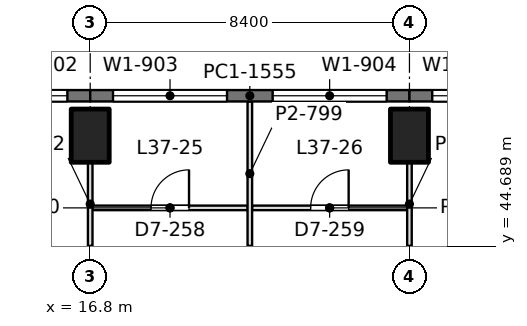
"""IFC4 building model, lengths in metres.
Left out: names, types, materials, properties, quantities, classifications, styles, units other than length and angle.
Written with IfcOpenShell. Run it as: python <this file> out.ifc"""

import sys

from ifc_helpers import new_model, si_unit, direction, frame, frame_2d, origin, origin_2d, place, context, subcontext, project, spatial, rectangle, extrude, element, fill, save


model = new_model("IFC4")
c1 = context("Model", 3, precision=1e-05, world=origin(), true_north=direction((0.0, 1.0)))
c2 = subcontext(c1, "Body", "Model", "MODEL_VIEW")
j1 = project(units=[si_unit("LENGTHUNIT", "METRE"), si_unit("PLANEANGLEUNIT", "RADIAN")], contexts=[c1])
p1 = place(None, origin())
s1 = spatial("IfcSite", under=j1, at=p1, CompositionType="ELEMENT")
p2 = place(p1, origin())
s2 = spatial("IfcBuilding", under=s1, at=p2, CompositionType="ELEMENT")
p3 = place(p2, frame((0.0, 0.0, 163.8)))
s3 = spatial("IfcBuildingStorey", under=s2, at=p3, CompositionType="ELEMENT", Elevation=163.8)
for number, where, z_axis, x_axis in (
    (1, (16.8, 47.6, 0.0), (0.0, 0.0, 1.0), (1.0, 0.0, 0.0)),
    (2, (25.2, 47.6, 0.0), (0.0, 0.0, 1.0), (1.0, 0.0, 0.0)),
):
    element("IfcColumn", number, at=place(p3, frame(where, z_axis=z_axis, x_axis=x_axis)), inside=s3, PredefinedType="COLUMN", context=c2, shape_type="SweptSolid", body=[
        extrude(rectangle(XDim=1.0, YDim=1.4, at=origin_2d()), origin(), (0.0, 0.0, 1.0), 4.2),
    ])
p4 = place(p3, frame((8.4, 48.65, 0.0), z_axis=(0.0, 0.0, 1.0), x_axis=(1.0, 0.0, 0.0)))
e3 = element("IfcWall", 3, at=p4, inside=s3, PredefinedType="SOLIDWALL", context=c2, shape_type="SweptSolid", body=[
    extrude(rectangle(XDim=8.4, YDim=0.3, at=frame_2d((4.2, 0.0))), origin(), (0.0, 0.0, 1.0), 4.0),
])
p5 = place(p4, frame((0.6, 0.0, 0.9)))
e4 = element("IfcOpeningElement", 4, at=p5, cuts=e3, PredefinedType="OPENING", context=c2, shape_type="SweptSolid", body=[
    extrude(rectangle(XDim=3.0, YDim=1.9, at=frame_2d((1.5, 0.95))), frame((0.0, 0.16, 0.0), z_axis=(0.0, -1.0, 0.0), x_axis=(1.0, 0.0, 0.0)), (0.0, 0.0, 1.0), 0.32),
])
p6 = place(p4, frame((4.8, 0.0, 0.9)))
e5 = element("IfcOpeningElement", 5, at=p6, cuts=e3, PredefinedType="OPENING", context=c2, shape_type="SweptSolid", body=[
    extrude(rectangle(XDim=3.0, YDim=1.9, at=frame_2d((1.5, 0.95))), frame((0.0, 0.16, 0.0), z_axis=(0.0, -1.0, 0.0), x_axis=(1.0, 0.0, 0.0)), (0.0, 0.0, 1.0), 0.32),
])
p7 = place(p3, frame((16.8, 48.65, 0.0), z_axis=(0.0, 0.0, 1.0), x_axis=(1.0, 0.0, 0.0)))
e6 = element("IfcWall", 6, at=p7, inside=s3, PredefinedType="SOLIDWALL", context=c2, shape_type="SweptSolid", body=[
    extrude(rectangle(XDim=8.4, YDim=0.3, at=frame_2d((4.2, 0.0))), origin(), (0.0, 0.0, 1.0), 4.0),
])
p8 = place(p7, frame((0.6, 0.0, 0.9)))
e7 = element("IfcOpeningElement", 7, at=p8, cuts=e6, PredefinedType="OPENING", context=c2, shape_type="SweptSolid", body=[
    extrude(rectangle(XDim=3.0, YDim=1.9, at=frame_2d((1.5, 0.95))), frame((0.0, 0.16, 0.0), z_axis=(0.0, -1.0, 0.0), x_axis=(1.0, 0.0, 0.0)), (0.0, 0.0, 1.0), 0.32),
])
p9 = place(p7, frame((4.8, 0.0, 0.9)))
e8 = element("IfcOpeningElement", 8, at=p9, cuts=e6, PredefinedType="OPENING", context=c2, shape_type="SweptSolid", body=[
    extrude(rectangle(XDim=3.0, YDim=1.9, at=frame_2d((1.5, 0.95))), frame((0.0, 0.16, 0.0), z_axis=(0.0, -1.0, 0.0), x_axis=(1.0, 0.0, 0.0)), (0.0, 0.0, 1.0), 0.32),
])
p10 = place(p3, frame((25.2, 48.65, 0.0), z_axis=(0.0, 0.0, 1.0), x_axis=(1.0, 0.0, 0.0)))
e9 = element("IfcWall", 9, at=p10, inside=s3, PredefinedType="SOLIDWALL", context=c2, shape_type="SweptSolid", body=[
    extrude(rectangle(XDim=8.4, YDim=0.3, at=frame_2d((4.2, 0.0))), origin(), (0.0, 0.0, 1.0), 4.0),
])
p11 = place(p10, frame((0.6, 0.0, 0.9)))
e10 = element("IfcOpeningElement", 10, at=p11, cuts=e9, PredefinedType="OPENING", context=c2, shape_type="SweptSolid", body=[
    extrude(rectangle(XDim=3.0, YDim=1.9, at=frame_2d((1.5, 0.95))), frame((0.0, 0.16, 0.0), z_axis=(0.0, -1.0, 0.0), x_axis=(1.0, 0.0, 0.0)), (0.0, 0.0, 1.0), 0.32),
])
p12 = place(p10, frame((4.8, 0.0, 0.9)))
e11 = element("IfcOpeningElement", 11, at=p12, cuts=e9, PredefinedType="OPENING", context=c2, shape_type="SweptSolid", body=[
    extrude(rectangle(XDim=3.0, YDim=1.9, at=frame_2d((1.5, 0.95))), frame((0.0, 0.16, 0.0), z_axis=(0.0, -1.0, 0.0), x_axis=(1.0, 0.0, 0.0)), (0.0, 0.0, 1.0), 0.32),
])
p13 = place(p3, frame((16.858, 45.7, 0.0), z_axis=(0.0, 0.0, 1.0), x_axis=(1.0, 0.0, 0.0)))
e12 = element("IfcWall", 12, at=p13, inside=s3, PredefinedType="PARTITIONING", context=c2, shape_type="SweptSolid", body=[
    extrude(rectangle(XDim=4.084, YDim=0.12, at=frame_2d((2.042, 0.0))), origin(), (0.0, 0.0, 1.0), 3.3),
])
p14 = place(p13, frame((1.542, 0.0, 0.0)))
e13 = element("IfcOpeningElement", 13, at=p14, cuts=e12, PredefinedType="OPENING", context=c2, shape_type="SweptSolid", body=[
    extrude(rectangle(XDim=1.0, YDim=2.4, at=frame_2d((0.5, 1.2))), frame((0.0, 0.07, 0.0), z_axis=(0.0, -1.0, 0.0), x_axis=(1.0, 0.0, 0.0)), (0.0, 0.0, 1.0), 0.14),
])
p15 = place(p3, frame((21.058, 45.7, 0.0), z_axis=(0.0, 0.0, 1.0), x_axis=(1.0, 0.0, 0.0)))
e14 = element("IfcWall", 14, at=p15, inside=s3, PredefinedType="PARTITIONING", context=c2, shape_type="SweptSolid", body=[
    extrude(rectangle(XDim=4.084, YDim=0.12, at=frame_2d((2.042, 0.0))), origin(), (0.0, 0.0, 1.0), 3.3),
])
p16 = place(p15, frame((1.542, 0.0, 0.0)))
e15 = element("IfcOpeningElement", 15, at=p16, cuts=e14, PredefinedType="OPENING", context=c2, shape_type="SweptSolid", body=[
    extrude(rectangle(XDim=1.0, YDim=2.4, at=frame_2d((0.5, 1.2))), frame((0.0, 0.07, 0.0), z_axis=(0.0, -1.0, 0.0), x_axis=(1.0, 0.0, 0.0)), (0.0, 0.0, 1.0), 0.14),
])
p17 = place(p3, frame((16.8, 44.7, 0.0), z_axis=(0.0, 0.0, 1.0), x_axis=(0.0, 1.0, 0.0)))
e16 = element("IfcWall", 16, at=p17, inside=s3, PredefinedType="PARTITIONING", context=c2, shape_type="SweptSolid", body=[
    extrude(rectangle(XDim=2.201, YDim=0.12, at=frame_2d((1.101, 0.0))), origin(), (0.0, 0.0, 1.0), 3.3),
])
p18 = place(p3, frame((21.0, 44.7, 0.0), z_axis=(0.0, 0.0, 1.0), x_axis=(0.0, 1.0, 0.0)))
e17 = element("IfcWall", 17, at=p18, inside=s3, PredefinedType="PARTITIONING", context=c2, shape_type="SweptSolid", body=[
    extrude(rectangle(XDim=3.802, YDim=0.12, at=frame_2d((1.901, 0.0))), origin(), (0.0, 0.0, 1.0), 3.593),
])
p19 = place(p3, frame((25.2, 44.7, 0.0), z_axis=(0.0, 0.0, 1.0), x_axis=(0.0, 1.0, 0.0)))
e18 = element("IfcWall", 18, at=p19, inside=s3, PredefinedType="PARTITIONING", context=c2, shape_type="SweptSolid", body=[
    extrude(rectangle(XDim=2.201, YDim=0.12, at=frame_2d((1.101, 0.0))), origin(), (0.0, 0.0, 1.0), 3.3),
])
p20 = place(p6, origin())
e19 = element("IfcWindow", 19, at=p20, inside=s3, PartitioningType="SINGLE_PANEL", PredefinedType="WINDOW", context=c2, shape_type="SweptSolid", body=[
    extrude(rectangle(XDim=3.0, YDim=1.9, at=frame_2d((1.5, 0.95))), frame((0.0, 0.03, 0.0), z_axis=(0.0, -1.0, 0.0), x_axis=(1.0, 0.0, 0.0)), (0.0, 0.0, 1.0), 0.06),
])
fill(e5, e19)
p21 = place(p8, origin())
e20 = element("IfcWindow", 20, at=p21, inside=s3, PartitioningType="SINGLE_PANEL", PredefinedType="WINDOW", context=c2, shape_type="SweptSolid", body=[
    extrude(rectangle(XDim=3.0, YDim=1.9, at=frame_2d((1.5, 0.95))), frame((0.0, 0.03, 0.0), z_axis=(0.0, -1.0, 0.0), x_axis=(1.0, 0.0, 0.0)), (0.0, 0.0, 1.0), 0.06),
])
fill(e7, e20)
p22 = place(p9, origin())
e21 = element("IfcWindow", 21, at=p22, inside=s3, PartitioningType="SINGLE_PANEL", PredefinedType="WINDOW", context=c2, shape_type="SweptSolid", body=[
    extrude(rectangle(XDim=3.0, YDim=1.9, at=frame_2d((1.5, 0.95))), frame((0.0, 0.03, 0.0), z_axis=(0.0, -1.0, 0.0), x_axis=(1.0, 0.0, 0.0)), (0.0, 0.0, 1.0), 0.06),
])
fill(e8, e21)
p23 = place(p11, origin())
e22 = element("IfcWindow", 22, at=p23, inside=s3, PartitioningType="SINGLE_PANEL", PredefinedType="WINDOW", context=c2, shape_type="SweptSolid", body=[
    extrude(rectangle(XDim=3.0, YDim=1.9, at=frame_2d((1.5, 0.95))), frame((0.0, 0.03, 0.0), z_axis=(0.0, -1.0, 0.0), x_axis=(1.0, 0.0, 0.0)), (0.0, 0.0, 1.0), 0.06),
])
fill(e10, e22)
p24 = place(p14, origin())
e23 = element("IfcDoor", 23, at=p24, inside=s3, OperationType="SINGLE_SWING_RIGHT", PredefinedType="DOOR", context=c2, shape_type="SweptSolid", body=[
    extrude(rectangle(XDim=1.0, YDim=2.4, at=frame_2d((0.5, 1.2))), frame((0.0, 0.025, 0.0), z_axis=(0.0, -1.0, 0.0), x_axis=(1.0, 0.0, 0.0)), (0.0, 0.0, 1.0), 0.05),
])
fill(e13, e23)
p25 = place(p16, origin())
e24 = element("IfcDoor", 24, at=p25, inside=s3, OperationType="SINGLE_SWING_RIGHT", PredefinedType="DOOR", context=c2, shape_type="SweptSolid", body=[
    extrude(rectangle(XDim=1.0, YDim=2.4, at=frame_2d((0.5, 1.2))), frame((0.0, 0.025, 0.0), z_axis=(0.0, -1.0, 0.0), x_axis=(1.0, 0.0, 0.0)), (0.0, 0.0, 1.0), 0.05),
])
fill(e15, e24)
save(model, sys.argv[1])
